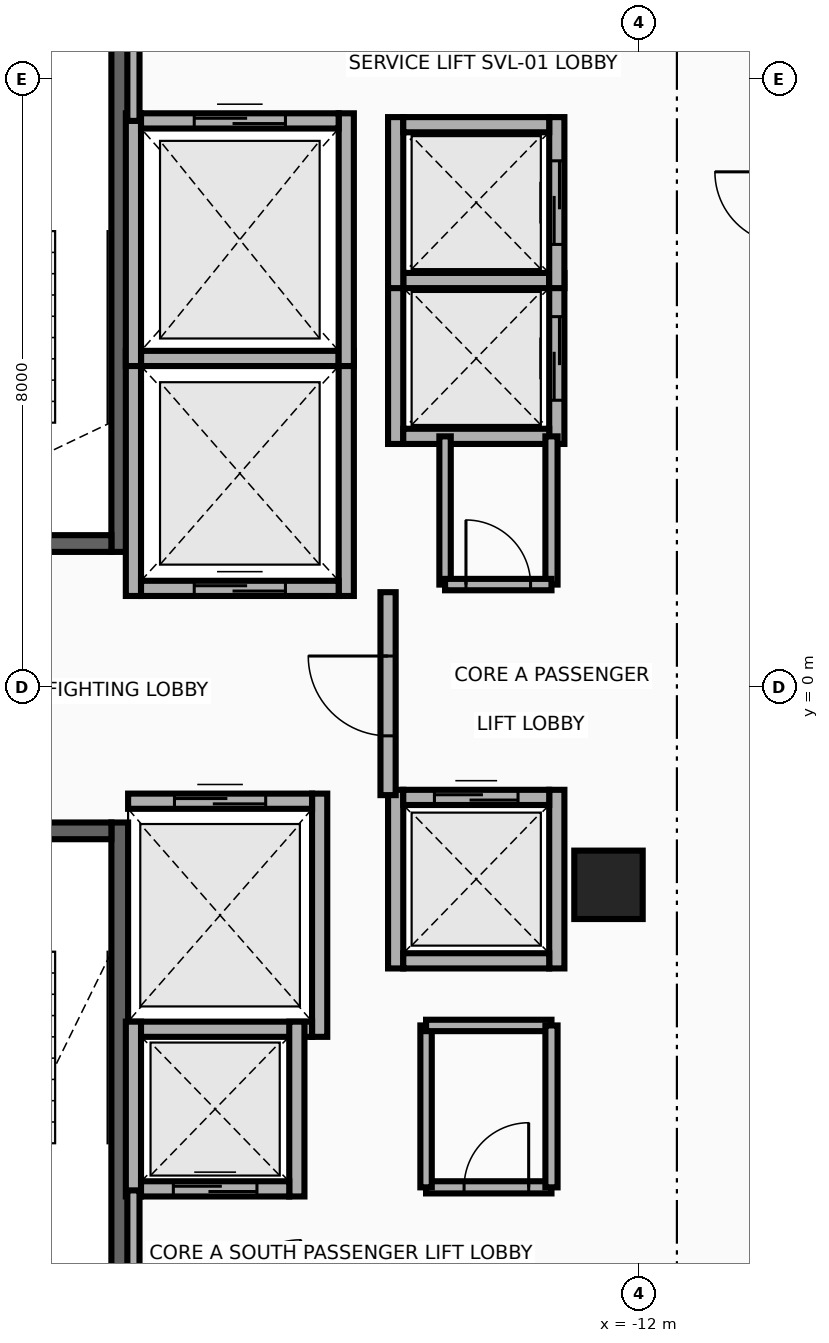
"""IFC4 building model, lengths in metres.
Left out: names, types, materials, properties, quantities, classifications, styles, units other than length and angle.
Written with IfcOpenShell. Run it as: python <this file> out.ifc"""

import sys

from ifc_helpers import new_model, si_unit, direction, frame, frame_2d, origin, origin_2d, place, context, subcontext, project, spatial, rectangle, extrude, source, transform, mapped, element, fill, save


model = new_model("IFC4")
c1 = context("Model", 3, precision=1e-05, world=origin(), true_north=direction((0.0, 1.0)))
c2 = subcontext(c1, "Body", "Model", "MODEL_VIEW")
j1 = project(units=[si_unit("LENGTHUNIT", "METRE"), si_unit("PLANEANGLEUNIT", "RADIAN")], contexts=[c1])
p1 = place(None, origin())
s1 = spatial("IfcSite", under=j1, at=p1, CompositionType="ELEMENT")
p2 = place(p1, origin())
s2 = spatial("IfcBuilding", under=s1, at=p2, CompositionType="ELEMENT")
p3 = place(p2, frame((0.0, 0.0, 212.5)))
s3 = spatial("IfcBuildingStorey", under=s2, at=p3, CompositionType="ELEMENT", Elevation=212.5)
p4 = place(p3, frame((-18.83, 1.78, 0.0), z_axis=(0.0, 0.0, 1.0), x_axis=(0.0, 1.0, 0.0)))
e1 = element("IfcWall", 1, at=p4, inside=s3, PredefinedType="SHEAR", context=c2, shape_type="SweptSolid", body=[
    extrude(rectangle(XDim=8.745, YDim=0.22, at=frame_2d((4.373, 0.0))), origin(), (0.0, 0.0, 1.0), 3.26),
])
p5 = place(p3, frame((-22.05, 1.89, 0.0), z_axis=(0.0, 0.0, 1.0), x_axis=(1.0, 0.0, 0.0)))
e2 = element("IfcWall", 2, at=p5, inside=s3, PredefinedType="SHEAR", context=c2, shape_type="SweptSolid", body=[
    extrude(rectangle(XDim=3.11, YDim=0.22, at=frame_2d((1.555, 0.0))), origin(), (0.0, 0.0, 1.0), 3.26),
])
p6 = place(p5, frame((1.0, 0.0, 0.0)))
e3 = element("IfcOpeningElement", 3, at=p6, cuts=e2, PredefinedType="OPENING", context=c2, shape_type="SweptSolid", body=[
    extrude(rectangle(XDim=1.1, YDim=2.15, at=frame_2d((0.55, 1.075))), frame((0.0, 0.125, 0.0), z_axis=(0.0, -1.0, 0.0), x_axis=(1.0, 0.0, 0.0)), (0.0, 0.0, 1.0), 0.25),
])
p7 = place(p3, frame((-18.83, -10.525, 0.0), z_axis=(0.0, 0.0, 1.0), x_axis=(0.0, 1.0, 0.0)))
e4 = element("IfcWall", 4, at=p7, inside=s3, PredefinedType="SHEAR", context=c2, shape_type="SweptSolid", body=[
    extrude(rectangle(XDim=8.745, YDim=0.22, at=frame_2d((4.373, 0.0))), origin(), (0.0, 0.0, 1.0), 3.26),
])
p8 = place(p3, frame((-22.05, -1.89, 0.0), z_axis=(0.0, 0.0, 1.0), x_axis=(1.0, 0.0, 0.0)))
e5 = element("IfcWall", 5, at=p8, inside=s3, PredefinedType="SHEAR", context=c2, shape_type="SweptSolid", body=[
    extrude(rectangle(XDim=3.11, YDim=0.22, at=frame_2d((1.555, 0.0))), origin(), (0.0, 0.0, 1.0), 3.26),
])
p9 = place(p8, frame((1.0, 0.0, 0.0)))
e6 = element("IfcOpeningElement", 6, at=p9, cuts=e5, PredefinedType="OPENING", context=c2, shape_type="SweptSolid", body=[
    extrude(rectangle(XDim=1.1, YDim=2.15, at=frame_2d((0.55, 1.075))), frame((0.0, 0.125, 0.0), z_axis=(0.0, -1.0, 0.0), x_axis=(1.0, 0.0, 0.0)), (0.0, 0.0, 1.0), 0.25),
])
m1 = source(origin(), c2, "Body", "SweptSolid", [
    extrude(rectangle(XDim=0.9, YDim=0.9, at=origin_2d()), origin(), (0.0, 0.0, 1.0), 3.5),
])
p10 = place(p3, frame((-12.4, -2.6, 0.0), z_axis=(0.0, 0.0, 1.0), x_axis=(1.0, 0.0, 0.0)))
e7 = element("IfcColumn", 7, at=p10, inside=s3, PredefinedType="COLUMN", context=c2, shape_type="MappedRepresentation", body=[
    mapped(m1, transform((0.0, 0.0, 0.0), x_axis=(1.0, 0.0, 0.0), y_axis=(0.0, 1.0, 0.0), z_axis=(0.0, 0.0, 1.0), scale=1.0)),
])
for number, where, z_axis, x_axis in (
    (8, (-18.65, 1.2, 0.0), (0.0, 0.0, 1.0), (0.0, 1.0, 0.0)),
    (9, (-15.85, 1.2, 0.0), (0.0, 0.0, 1.0), (0.0, 1.0, 0.0)),
):
    element("IfcWall", number, at=place(p3, frame(where, z_axis=z_axis, x_axis=x_axis)), inside=s3, PredefinedType="MOVABLE", context=c2, shape_type="SweptSolid", body=[
        extrude(rectangle(XDim=3.225, YDim=0.2, at=frame_2d((1.613, 0.0))), origin(), (0.0, 0.0, 1.0), 3.26),
    ])
p11 = place(p3, frame((-18.55, 1.3, 0.0), z_axis=(0.0, 0.0, 1.0), x_axis=(1.0, 0.0, 0.0)))
e10 = element("IfcWall", 10, at=p11, inside=s3, PredefinedType="MOVABLE", context=c2, shape_type="SweptSolid", body=[
    extrude(rectangle(XDim=2.6, YDim=0.2, at=frame_2d((1.3, 0.0))), origin(), (0.0, 0.0, 1.0), 3.26),
])
p12 = place(p11, frame((0.7, 0.0, 0.0)))
e11 = element("IfcOpeningElement", 11, at=p12, cuts=e10, PredefinedType="OPENING", context=c2, shape_type="SweptSolid", body=[
    extrude(rectangle(XDim=1.2, YDim=2.1, at=frame_2d((0.6, 1.05))), frame((0.0, 0.115, 0.0), z_axis=(0.0, -1.0, 0.0), x_axis=(1.0, 0.0, 0.0)), (0.0, 0.0, 1.0), 0.23),
])
p13 = place(p3, frame((-18.55, 4.325, 0.0), z_axis=(0.0, 0.0, 1.0), x_axis=(1.0, 0.0, 0.0)))
e12 = element("IfcWall", 12, at=p13, inside=s3, PredefinedType="MOVABLE", context=c2, shape_type="SweptSolid", body=[
    extrude(rectangle(XDim=2.6, YDim=0.2, at=frame_2d((1.3, 0.0))), origin(), (0.0, 0.0, 1.0), 3.26),
])
p14 = place(p3, frame((-16.2, -4.6, 0.0), z_axis=(0.0, 0.0, 1.0), x_axis=(0.0, 1.0, 0.0)))
e13 = element("IfcWall", 13, at=p14, inside=s3, PredefinedType="MOVABLE", context=c2, shape_type="SweptSolid", body=[
    extrude(rectangle(XDim=3.2, YDim=0.2, at=frame_2d((1.6, 0.0))), origin(), (0.0, 0.0, 1.0), 3.26),
])
p15 = place(p3, frame((-18.72, -4.5, 0.0), z_axis=(0.0, 0.0, 1.0), x_axis=(1.0, 0.0, 0.0)))
e14 = element("IfcWall", 14, at=p15, inside=s3, PredefinedType="MOVABLE", context=c2, shape_type="SweptSolid", body=[
    extrude(rectangle(XDim=2.42, YDim=0.2, at=frame_2d((1.21, 0.0))), origin(), (0.0, 0.0, 1.0), 3.26),
])
p16 = place(p3, frame((-18.72, -1.5, 0.0), z_axis=(0.0, 0.0, 1.0), x_axis=(1.0, 0.0, 0.0)))
e15 = element("IfcWall", 15, at=p16, inside=s3, PredefinedType="MOVABLE", context=c2, shape_type="SweptSolid", body=[
    extrude(rectangle(XDim=2.42, YDim=0.2, at=frame_2d((1.21, 0.0))), origin(), (0.0, 0.0, 1.0), 3.26),
])
p17 = place(p16, frame((0.61, 0.0, 0.0)))
e16 = element("IfcOpeningElement", 16, at=p17, cuts=e15, PredefinedType="OPENING", context=c2, shape_type="SweptSolid", body=[
    extrude(rectangle(XDim=1.2, YDim=2.1, at=frame_2d((0.6, 1.05))), frame((0.0, 0.115, 0.0), z_axis=(0.0, -1.0, 0.0), x_axis=(1.0, 0.0, 0.0)), (0.0, 0.0, 1.0), 0.23),
])
for number, where, z_axis, x_axis in (
    (17, (-18.65, 4.225, 0.0), (0.0, 0.0, 1.0), (0.0, 1.0, 0.0)),
    (18, (-15.85, 4.225, 0.0), (0.0, 0.0, 1.0), (0.0, 1.0, 0.0)),
):
    element("IfcWall", number, at=place(p3, frame(where, z_axis=z_axis, x_axis=x_axis)), inside=s3, PredefinedType="MOVABLE", context=c2, shape_type="SweptSolid", body=[
        extrude(rectangle(XDim=3.325, YDim=0.2, at=frame_2d((1.663, 0.0))), origin(), (0.0, 0.0, 1.0), 3.26),
    ])
p18 = place(p3, frame((-18.55, 7.45, 0.0), z_axis=(0.0, 0.0, 1.0), x_axis=(1.0, 0.0, 0.0)))
e19 = element("IfcWall", 19, at=p18, inside=s3, PredefinedType="MOVABLE", context=c2, shape_type="SweptSolid", body=[
    extrude(rectangle(XDim=2.6, YDim=0.2, at=frame_2d((1.3, 0.0))), origin(), (0.0, 0.0, 1.0), 3.26),
])
p19 = place(p18, frame((0.7, 0.0, 0.0)))
e20 = element("IfcOpeningElement", 20, at=p19, cuts=e19, PredefinedType="OPENING", context=c2, shape_type="SweptSolid", body=[
    extrude(rectangle(XDim=1.2, YDim=2.1, at=frame_2d((0.6, 1.05))), frame((0.0, 0.115, 0.0), z_axis=(0.0, -1.0, 0.0), x_axis=(1.0, 0.0, 0.0)), (0.0, 0.0, 1.0), 0.23),
])
p20 = place(p3, frame((-15.2, 3.2, 0.0), z_axis=(0.0, 0.0, 1.0), x_axis=(0.0, 1.0, 0.0)))
e21 = element("IfcWall", 21, at=p20, inside=s3, PredefinedType="MOVABLE", context=c2, shape_type="SweptSolid", body=[
    extrude(rectangle(XDim=2.25, YDim=0.2, at=frame_2d((1.125, 0.0))), origin(), (0.0, 0.0, 1.0), 3.26),
])
p21 = place(p3, frame((-13.08, 3.2, 0.0), z_axis=(0.0, 0.0, 1.0), x_axis=(0.0, 1.0, 0.0)))
e22 = element("IfcWall", 22, at=p21, inside=s3, PredefinedType="MOVABLE", context=c2, shape_type="SweptSolid", body=[
    extrude(rectangle(XDim=2.25, YDim=0.2, at=frame_2d((1.125, 0.0))), origin(), (0.0, 0.0, 1.0), 3.26),
])
p22 = place(p21, frame((0.575, 0.0, 0.0)))
e23 = element("IfcOpeningElement", 23, at=p22, cuts=e22, PredefinedType="OPENING", context=c2, shape_type="SweptSolid", body=[
    extrude(rectangle(XDim=1.1, YDim=2.1, at=frame_2d((0.55, 1.05))), frame((0.0, 0.115, 0.0), z_axis=(0.0, -1.0, 0.0), x_axis=(1.0, 0.0, 0.0)), (0.0, 0.0, 1.0), 0.23),
])
for number, where, z_axis, x_axis in (
    (24, (-15.1, 3.3, 0.0), (0.0, 0.0, 1.0), (1.0, 0.0, 0.0)),
    (25, (-15.1, 5.35, 0.0), (0.0, 0.0, 1.0), (1.0, 0.0, 0.0)),
):
    element("IfcWall", number, at=place(p3, frame(where, z_axis=z_axis, x_axis=x_axis)), inside=s3, PredefinedType="MOVABLE", context=c2, shape_type="SweptSolid", body=[
        extrude(rectangle(XDim=1.92, YDim=0.2, at=frame_2d((0.96, 0.0))), origin(), (0.0, 0.0, 1.0), 3.26),
    ])
p23 = place(p3, frame((-15.2, 5.25, 0.0), z_axis=(0.0, 0.0, 1.0), x_axis=(0.0, 1.0, 0.0)))
e26 = element("IfcWall", 26, at=p23, inside=s3, PredefinedType="MOVABLE", context=c2, shape_type="SweptSolid", body=[
    extrude(rectangle(XDim=2.25, YDim=0.2, at=frame_2d((1.125, 0.0))), origin(), (0.0, 0.0, 1.0), 3.26),
])
p24 = place(p3, frame((-13.08, 5.25, 0.0), z_axis=(0.0, 0.0, 1.0), x_axis=(0.0, 1.0, 0.0)))
e27 = element("IfcWall", 27, at=p24, inside=s3, PredefinedType="MOVABLE", context=c2, shape_type="SweptSolid", body=[
    extrude(rectangle(XDim=2.25, YDim=0.2, at=frame_2d((1.125, 0.0))), origin(), (0.0, 0.0, 1.0), 3.26),
])
p25 = place(p24, frame((0.575, 0.0, 0.0)))
e28 = element("IfcOpeningElement", 28, at=p25, cuts=e27, PredefinedType="OPENING", context=c2, shape_type="SweptSolid", body=[
    extrude(rectangle(XDim=1.1, YDim=2.1, at=frame_2d((0.55, 1.05))), frame((0.0, 0.115, 0.0), z_axis=(0.0, -1.0, 0.0), x_axis=(1.0, 0.0, 0.0)), (0.0, 0.0, 1.0), 0.23),
])
p26 = place(p3, frame((-15.1, 7.4, 0.0), z_axis=(0.0, 0.0, 1.0), x_axis=(1.0, 0.0, 0.0)))
e29 = element("IfcWall", 29, at=p26, inside=s3, PredefinedType="MOVABLE", context=c2, shape_type="SweptSolid", body=[
    extrude(rectangle(XDim=1.92, YDim=0.2, at=frame_2d((0.96, 0.0))), origin(), (0.0, 0.0, 1.0), 3.26),
])
for number, where, z_axis, x_axis in (
    (30, (-18.65, -6.7, 0.0), (0.0, 0.0, 1.0), (0.0, 1.0, 0.0)),
    (31, (-16.5, -6.7, 0.0), (0.0, 0.0, 1.0), (0.0, 1.0, 0.0)),
):
    element("IfcWall", number, at=place(p3, frame(where, z_axis=z_axis, x_axis=x_axis)), inside=s3, PredefinedType="MOVABLE", context=c2, shape_type="SweptSolid", body=[
        extrude(rectangle(XDim=2.3, YDim=0.2, at=frame_2d((1.15, 0.0))), origin(), (0.0, 0.0, 1.0), 3.26),
    ])
p27 = place(p3, frame((-18.55, -6.6, 0.0), z_axis=(0.0, 0.0, 1.0), x_axis=(1.0, 0.0, 0.0)))
e32 = element("IfcWall", 32, at=p27, inside=s3, PredefinedType="MOVABLE", context=c2, shape_type="SweptSolid", body=[
    extrude(rectangle(XDim=1.95, YDim=0.2, at=frame_2d((0.975, 0.0))), origin(), (0.0, 0.0, 1.0), 3.26),
])
p28 = place(p27, frame((0.425, 0.0, 0.0)))
e33 = element("IfcOpeningElement", 33, at=p28, cuts=e32, PredefinedType="OPENING", context=c2, shape_type="SweptSolid", body=[
    extrude(rectangle(XDim=1.1, YDim=2.1, at=frame_2d((0.55, 1.05))), frame((0.0, 0.115, 0.0), z_axis=(0.0, -1.0, 0.0), x_axis=(1.0, 0.0, 0.0)), (0.0, 0.0, 1.0), 0.23),
])
for number, where, z_axis, x_axis in (
    (34, (-15.2, -3.7, 0.0), (0.0, 0.0, 1.0), (0.0, 1.0, 0.0)),
    (35, (-13.08, -3.7, 0.0), (0.0, 0.0, 1.0), (0.0, 1.0, 0.0)),
):
    element("IfcWall", number, at=place(p3, frame(where, z_axis=z_axis, x_axis=x_axis)), inside=s3, PredefinedType="MOVABLE", context=c2, shape_type="SweptSolid", body=[
        extrude(rectangle(XDim=2.35, YDim=0.2, at=frame_2d((1.175, 0.0))), origin(), (0.0, 0.0, 1.0), 3.26),
    ])
p29 = place(p3, frame((-15.1, -3.6, 0.0), z_axis=(0.0, 0.0, 1.0), x_axis=(1.0, 0.0, 0.0)))
e36 = element("IfcWall", 36, at=p29, inside=s3, PredefinedType="MOVABLE", context=c2, shape_type="SweptSolid", body=[
    extrude(rectangle(XDim=1.92, YDim=0.2, at=frame_2d((0.96, 0.0))), origin(), (0.0, 0.0, 1.0), 3.26),
])
p30 = place(p3, frame((-15.1, -1.45, 0.0), z_axis=(0.0, 0.0, 1.0), x_axis=(1.0, 0.0, 0.0)))
e37 = element("IfcWall", 37, at=p30, inside=s3, PredefinedType="MOVABLE", context=c2, shape_type="SweptSolid", body=[
    extrude(rectangle(XDim=1.92, YDim=0.2, at=frame_2d((0.96, 0.0))), origin(), (0.0, 0.0, 1.0), 3.26),
])
p31 = place(p30, frame((0.41, 0.0, 0.0)))
e38 = element("IfcOpeningElement", 38, at=p31, cuts=e37, PredefinedType="OPENING", context=c2, shape_type="SweptSolid", body=[
    extrude(rectangle(XDim=1.1, YDim=2.1, at=frame_2d((0.55, 1.05))), frame((0.0, 0.115, 0.0), z_axis=(0.0, -1.0, 0.0), x_axis=(1.0, 0.0, 0.0)), (0.0, 0.0, 1.0), 0.23),
])
p32 = place(p3, frame((-15.3, -1.42, 0.0), z_axis=(0.0, 0.0, 1.0), x_axis=(0.0, 1.0, 0.0)))
e39 = element("IfcWall", 39, at=p32, inside=s3, PredefinedType="PARTITIONING", context=c2, shape_type="SweptSolid", body=[
    extrude(rectangle(XDim=2.67, YDim=0.2, at=frame_2d((1.335, 0.0))), origin(), (0.0, 0.0, 1.0), 3.26),
])
p33 = place(p32, frame((0.78, 0.0, 0.0)))
e40 = element("IfcOpeningElement", 40, at=p33, cuts=e39, PredefinedType="OPENING", context=c2, shape_type="SweptSolid", body=[
    extrude(rectangle(XDim=1.05, YDim=2.15, at=frame_2d((0.525, 1.075))), frame((0.0, 0.115, 0.0), z_axis=(0.0, -1.0, 0.0), x_axis=(1.0, 0.0, 0.0)), (0.0, 0.0, 1.0), 0.23),
])
p34 = place(p3, frame((-18.65, 7.45, 0.0), z_axis=(0.0, 0.0, 1.0), x_axis=(0.0, 1.0, 0.0)))
e41 = element("IfcWall", 41, at=p34, inside=s3, PredefinedType="PARTITIONING", context=c2, shape_type="SweptSolid", body=[
    extrude(rectangle(XDim=2.93, YDim=0.16, at=frame_2d((1.465, 0.0))), origin(), (0.0, 0.0, 1.0), 3.26),
])
p35 = place(p3, frame((-18.65, -8.18, 0.0), z_axis=(0.0, 0.0, 1.0), x_axis=(0.0, 1.0, 0.0)))
e42 = element("IfcWall", 42, at=p35, inside=s3, PredefinedType="PARTITIONING", context=c2, shape_type="SweptSolid", body=[
    extrude(rectangle(XDim=1.56, YDim=0.16, at=frame_2d((0.78, 0.0))), origin(), (0.0, 0.0, 1.0), 3.26),
])
p36 = place(p3, frame((-14.8, -6.58, 0.0), z_axis=(0.0, 0.0, 1.0), x_axis=(1.0, 0.0, 0.0)))
e43 = element("IfcWall", 43, at=p36, inside=s3, PredefinedType="PARTITIONING", context=c2, shape_type="SweptSolid", body=[
    extrude(rectangle(XDim=1.65, YDim=0.16, at=frame_2d((0.825, 0.0))), origin(), (0.0, 0.0, 1.0), 3.26),
])
p37 = place(p36, frame((0.5, 0.0, 0.0)))
e44 = element("IfcOpeningElement", 44, at=p37, cuts=e43, PredefinedType="OPENING", context=c2, shape_type="SweptSolid", body=[
    extrude(rectangle(XDim=0.85, YDim=2.05, at=frame_2d((0.425, 1.025))), frame((0.0, 0.095, 0.0), z_axis=(0.0, -1.0, 0.0), x_axis=(1.0, 0.0, 0.0)), (0.0, 0.0, 1.0), 0.19),
])
p38 = place(p3, frame((-14.8, -6.58, 0.0), z_axis=(0.0, 0.0, 1.0), x_axis=(0.0, 1.0, 0.0)))
e45 = element("IfcWall", 45, at=p38, inside=s3, PredefinedType="PARTITIONING", context=c2, shape_type="SweptSolid", body=[
    extrude(rectangle(XDim=2.13, YDim=0.15, at=frame_2d((1.065, 0.0))), origin(), (0.0, 0.0, 1.0), 3.26),
])
p39 = place(p3, frame((-14.8, -4.45, 0.0), z_axis=(0.0, 0.0, 1.0), x_axis=(1.0, 0.0, 0.0)))
e46 = element("IfcWall", 46, at=p39, inside=s3, PredefinedType="PARTITIONING", context=c2, shape_type="SweptSolid", body=[
    extrude(rectangle(XDim=1.65, YDim=0.15, at=frame_2d((0.825, 0.0))), origin(), (0.0, 0.0, 1.0), 3.26),
])
p40 = place(p3, frame((-13.15, -6.58, 0.0), z_axis=(0.0, 0.0, 1.0), x_axis=(0.0, 1.0, 0.0)))
e47 = element("IfcWall", 47, at=p40, inside=s3, PredefinedType="PARTITIONING", context=c2, shape_type="SweptSolid", body=[
    extrude(rectangle(XDim=2.13, YDim=0.16, at=frame_2d((1.065, 0.0))), origin(), (0.0, 0.0, 1.0), 3.26),
])
p41 = place(p3, frame((-13.15, 1.35, 0.0), z_axis=(0.0, 0.0, 1.0), x_axis=(0.0, 1.0, 0.0)))
e48 = element("IfcWall", 48, at=p41, inside=s3, PredefinedType="PARTITIONING", context=c2, shape_type="SweptSolid", body=[
    extrude(rectangle(XDim=1.95, YDim=0.16, at=frame_2d((0.975, 0.0))), origin(), (0.0, 0.0, 1.0), 3.26),
])
p42 = place(p3, frame((-14.55, 1.35, 0.0), z_axis=(0.0, 0.0, 1.0), x_axis=(0.0, 1.0, 0.0)))
e49 = element("IfcWall", 49, at=p42, inside=s3, PredefinedType="PARTITIONING", context=c2, shape_type="SweptSolid", body=[
    extrude(rectangle(XDim=1.95, YDim=0.15, at=frame_2d((0.975, 0.0))), origin(), (0.0, 0.0, 1.0), 3.26),
])
p43 = place(p3, frame((-14.55, 1.35, 0.0), z_axis=(0.0, 0.0, 1.0), x_axis=(1.0, 0.0, 0.0)))
e50 = element("IfcWall", 50, at=p43, inside=s3, PredefinedType="PARTITIONING", context=c2, shape_type="SweptSolid", body=[
    extrude(rectangle(XDim=1.4, YDim=0.15, at=frame_2d((0.7, 0.0))), origin(), (0.0, 0.0, 1.0), 3.26),
])
p44 = place(p43, frame((0.275, 0.0, 0.0)))
e51 = element("IfcOpeningElement", 51, at=p44, cuts=e50, PredefinedType="OPENING", context=c2, shape_type="SweptSolid", body=[
    extrude(rectangle(XDim=0.85, YDim=2.05, at=frame_2d((0.425, 1.025))), frame((0.0, 0.09, 0.0), z_axis=(0.0, -1.0, 0.0), x_axis=(1.0, 0.0, 0.0)), (0.0, 0.0, 1.0), 0.18),
])
p45 = place(p12, origin())
e52 = element("IfcDoor", 52, at=p45, inside=s3, OperationType="DOUBLE_DOOR_SLIDING", PredefinedType="DOOR", context=c2, shape_type="SweptSolid", body=[
    extrude(rectangle(XDim=1.2, YDim=2.1, at=frame_2d((0.6, 1.05))), frame((0.0, 0.025, 0.0), z_axis=(0.0, -1.0, 0.0), x_axis=(1.0, 0.0, 0.0)), (0.0, 0.0, 1.0), 0.05),
])
fill(e11, e52)
p46 = place(p17, origin())
e53 = element("IfcDoor", 53, at=p46, inside=s3, OperationType="DOUBLE_DOOR_SLIDING", PredefinedType="DOOR", context=c2, shape_type="SweptSolid", body=[
    extrude(rectangle(XDim=1.2, YDim=2.1, at=frame_2d((0.6, 1.05))), frame((0.0, 0.025, 0.0), z_axis=(0.0, -1.0, 0.0), x_axis=(1.0, 0.0, 0.0)), (0.0, 0.0, 1.0), 0.05),
])
fill(e16, e53)
p47 = place(p19, origin())
e54 = element("IfcDoor", 54, at=p47, inside=s3, OperationType="DOUBLE_DOOR_SLIDING", PredefinedType="DOOR", context=c2, shape_type="SweptSolid", body=[
    extrude(rectangle(XDim=1.2, YDim=2.1, at=frame_2d((0.6, 1.05))), frame((0.0, 0.025, 0.0), z_axis=(0.0, -1.0, 0.0), x_axis=(1.0, 0.0, 0.0)), (0.0, 0.0, 1.0), 0.05),
])
fill(e20, e54)
p48 = place(p22, origin())
e55 = element("IfcDoor", 55, at=p48, inside=s3, OperationType="DOUBLE_DOOR_SLIDING", PredefinedType="DOOR", context=c2, shape_type="SweptSolid", body=[
    extrude(rectangle(XDim=1.1, YDim=2.1, at=frame_2d((0.55, 1.05))), frame((0.0, 0.025, 0.0), z_axis=(0.0, -1.0, 0.0), x_axis=(1.0, 0.0, 0.0)), (0.0, 0.0, 1.0), 0.05),
])
fill(e23, e55)
p49 = place(p25, origin())
e56 = element("IfcDoor", 56, at=p49, inside=s3, OperationType="DOUBLE_DOOR_SLIDING", PredefinedType="DOOR", context=c2, shape_type="SweptSolid", body=[
    extrude(rectangle(XDim=1.1, YDim=2.1, at=frame_2d((0.55, 1.05))), frame((0.0, 0.025, 0.0), z_axis=(0.0, -1.0, 0.0), x_axis=(1.0, 0.0, 0.0)), (0.0, 0.0, 1.0), 0.05),
])
fill(e28, e56)
p50 = place(p28, origin())
e57 = element("IfcDoor", 57, at=p50, inside=s3, OperationType="DOUBLE_DOOR_SLIDING", PredefinedType="DOOR", context=c2, shape_type="SweptSolid", body=[
    extrude(rectangle(XDim=1.1, YDim=2.1, at=frame_2d((0.55, 1.05))), frame((0.0, 0.025, 0.0), z_axis=(0.0, -1.0, 0.0), x_axis=(1.0, 0.0, 0.0)), (0.0, 0.0, 1.0), 0.05),
])
fill(e33, e57)
p51 = place(p31, origin())
e58 = element("IfcDoor", 58, at=p51, inside=s3, OperationType="DOUBLE_DOOR_SLIDING", PredefinedType="DOOR", context=c2, shape_type="SweptSolid", body=[
    extrude(rectangle(XDim=1.1, YDim=2.1, at=frame_2d((0.55, 1.05))), frame((0.0, 0.025, 0.0), z_axis=(0.0, -1.0, 0.0), x_axis=(1.0, 0.0, 0.0)), (0.0, 0.0, 1.0), 0.05),
])
fill(e38, e58)
p52 = place(p33, origin())
e59 = element("IfcDoor", 59, at=p52, inside=s3, OperationType="SINGLE_SWING_RIGHT", PredefinedType="DOOR", context=c2, shape_type="SweptSolid", body=[
    extrude(rectangle(XDim=1.05, YDim=2.15, at=frame_2d((0.525, 1.075))), frame((0.0, 0.025, 0.0), z_axis=(0.0, -1.0, 0.0), x_axis=(1.0, 0.0, 0.0)), (0.0, 0.0, 1.0), 0.05),
])
fill(e40, e59)
p53 = place(p37, origin())
e60 = element("IfcDoor", 60, at=p53, inside=s3, OperationType="SINGLE_SWING_LEFT", PredefinedType="DOOR", context=c2, shape_type="SweptSolid", body=[
    extrude(rectangle(XDim=0.85, YDim=2.05, at=frame_2d((0.425, 1.025))), frame((0.0, 0.025, 0.0), z_axis=(0.0, -1.0, 0.0), x_axis=(1.0, 0.0, 0.0)), (0.0, 0.0, 1.0), 0.05),
])
fill(e44, e60)
p54 = place(p44, origin())
e61 = element("IfcDoor", 61, at=p54, inside=s3, OperationType="SINGLE_SWING_RIGHT", PredefinedType="DOOR", context=c2, shape_type="SweptSolid", body=[
    extrude(rectangle(XDim=0.85, YDim=2.05, at=frame_2d((0.425, 1.025))), frame((0.0, 0.025, 0.0), z_axis=(0.0, -1.0, 0.0), x_axis=(1.0, 0.0, 0.0)), (0.0, 0.0, 1.0), 0.05),
])
fill(e51, e61)
save(model, sys.argv[1])
